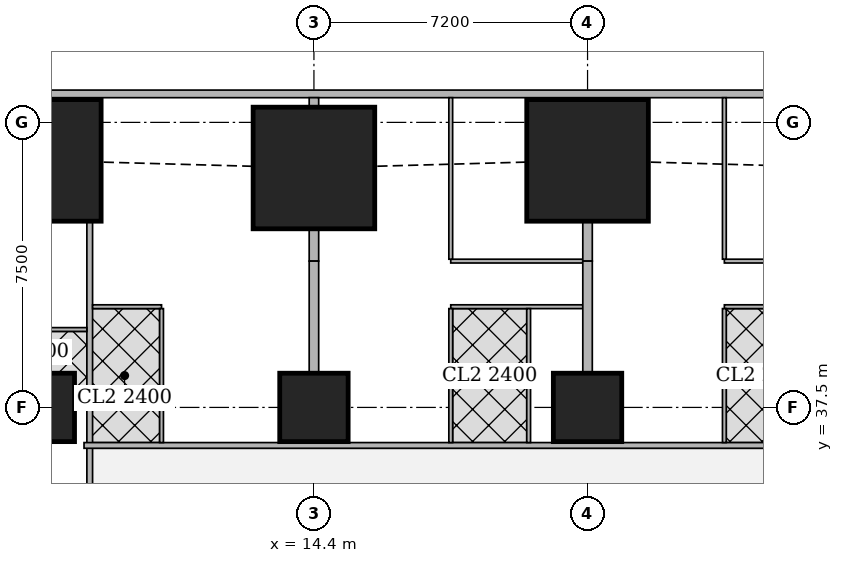
"""IFC4 building model, lengths in metres.
Left out: names, types, materials, properties, quantities, classifications, styles, units other than length and angle.
Written with IfcOpenShell. Run it as: python <this file> out.ifc"""

import sys

from ifc_helpers import new_model, si_unit, direction, frame, frame_2d, origin, origin_2d, place, context, subcontext, project, spatial, rectangle, extrude, element, fill, save


model = new_model("IFC4")
c1 = context("Model", 3, precision=1e-05, world=origin(), true_north=direction((0.0, 1.0)))
c2 = subcontext(c1, "Body", "Model", "MODEL_VIEW")
j1 = project(units=[si_unit("LENGTHUNIT", "METRE"), si_unit("PLANEANGLEUNIT", "RADIAN")], contexts=[c1])
p1 = place(None, origin())
s1 = spatial("IfcSite", under=j1, at=p1, CompositionType="ELEMENT")
p2 = place(p1, origin())
s2 = spatial("IfcBuilding", under=s1, at=p2, CompositionType="ELEMENT")
p3 = place(p2, frame((0.0, 0.0, 20.0)))
s3 = spatial("IfcBuildingStorey", under=s2, at=p3, CompositionType="ELEMENT", Elevation=20.0)
for number, where, z_axis, x_axis in (
    (1, (7.2, 37.5, 0.0), (0.0, 0.0, 1.0), (1.0, 0.0, 0.0)),
    (2, (14.4, 37.5, 0.0), (0.0, 0.0, 1.0), (1.0, 0.0, 0.0)),
    (3, (21.6, 37.5, 0.0), (0.0, 0.0, 1.0), (1.0, 0.0, 0.0)),
):
    element("IfcColumn", number, at=place(p3, frame(where, z_axis=z_axis, x_axis=x_axis)), inside=s3, PredefinedType="COLUMN", context=c2, shape_type="SweptSolid", body=[
        extrude(rectangle(XDim=1.8, YDim=1.8, at=origin_2d()), origin(), (0.0, 0.0, 1.0), 3.75),
    ])
p4 = place(p3, frame((7.2, 44.0, -0.3), z_axis=(0.0, 0.0, 1.0), x_axis=(1.0, 0.0, 0.0)))
e4 = element("IfcColumn", 4, at=p4, inside=s3, PredefinedType="COLUMN", context=c2, shape_type="SweptSolid", body=[
    extrude(rectangle(XDim=3.2, YDim=3.2, at=origin_2d()), origin(), (0.0, 0.0, 1.0), 4.05),
])
p5 = place(p3, frame((14.4, 43.8, 0.0), z_axis=(0.0, 0.0, 1.0), x_axis=(1.0, 0.0, 0.0)))
e5 = element("IfcColumn", 5, at=p5, inside=s3, PredefinedType="COLUMN", context=c2, shape_type="SweptSolid", body=[
    extrude(rectangle(XDim=3.2, YDim=3.2, at=origin_2d()), origin(), (0.0, 0.0, 1.0), 3.75),
])
p6 = place(p3, frame((21.6, 44.0, -0.3), z_axis=(0.0, 0.0, 1.0), x_axis=(1.0, 0.0, 0.0)))
e6 = element("IfcColumn", 6, at=p6, inside=s3, PredefinedType="COLUMN", context=c2, shape_type="SweptSolid", body=[
    extrude(rectangle(XDim=3.2, YDim=3.2, at=origin_2d()), origin(), (0.0, 0.0, 1.0), 4.05),
])
p7 = place(p3, frame((40.106, 45.75, 0.0), z_axis=(0.0, 0.0, 1.0), x_axis=(-1.0, 0.0, 0.0)))
e7 = element("IfcWall", 7, at=p7, inside=s3, PredefinedType="SOLIDWALL", context=c2, shape_type="SweptSolid", body=[
    extrude(rectangle(XDim=37.943, YDim=0.2, at=frame_2d((18.971, 0.0))), origin(), (0.0, 0.0, 1.0), 3.5),
])
p8 = place(p7, frame((8.606, 0.0, 0.9)))
e8 = element("IfcOpeningElement", 8, at=p8, cuts=e7, PredefinedType="OPENING", context=c2, shape_type="SweptSolid", body=[
    extrude(rectangle(XDim=1.8, YDim=1.5, at=frame_2d((0.9, 0.75))), frame((0.0, 0.11, 0.0), z_axis=(0.0, -1.0, 0.0), x_axis=(1.0, 0.0, 0.0)), (0.0, 0.0, 1.0), 0.22),
])
p9 = place(p7, frame((12.206, 0.0, 0.9)))
e9 = element("IfcOpeningElement", 9, at=p9, cuts=e7, PredefinedType="OPENING", context=c2, shape_type="SweptSolid", body=[
    extrude(rectangle(XDim=1.8, YDim=1.5, at=frame_2d((0.9, 0.75))), frame((0.0, 0.11, 0.0), z_axis=(0.0, -1.0, 0.0), x_axis=(1.0, 0.0, 0.0)), (0.0, 0.0, 1.0), 0.22),
])
p10 = place(p7, frame((15.806, 0.0, 0.9)))
e10 = element("IfcOpeningElement", 10, at=p10, cuts=e7, PredefinedType="OPENING", context=c2, shape_type="SweptSolid", body=[
    extrude(rectangle(XDim=1.8, YDim=1.5, at=frame_2d((0.9, 0.75))), frame((0.0, 0.11, 0.0), z_axis=(0.0, -1.0, 0.0), x_axis=(1.0, 0.0, 0.0)), (0.0, 0.0, 1.0), 0.22),
])
p11 = place(p7, frame((19.406, 0.0, 0.9)))
e11 = element("IfcOpeningElement", 11, at=p11, cuts=e7, PredefinedType="OPENING", context=c2, shape_type="SweptSolid", body=[
    extrude(rectangle(XDim=1.8, YDim=1.5, at=frame_2d((0.9, 0.75))), frame((0.0, 0.11, 0.0), z_axis=(0.0, -1.0, 0.0), x_axis=(1.0, 0.0, 0.0)), (0.0, 0.0, 1.0), 0.22),
])
p12 = place(p7, frame((23.006, 0.0, 0.9)))
e12 = element("IfcOpeningElement", 12, at=p12, cuts=e7, PredefinedType="OPENING", context=c2, shape_type="SweptSolid", body=[
    extrude(rectangle(XDim=1.8, YDim=1.5, at=frame_2d((0.9, 0.75))), frame((0.0, 0.11, 0.0), z_axis=(0.0, -1.0, 0.0), x_axis=(1.0, 0.0, 0.0)), (0.0, 0.0, 1.0), 0.22),
])
p13 = place(p7, frame((26.606, 0.0, 0.9)))
e13 = element("IfcOpeningElement", 13, at=p13, cuts=e7, PredefinedType="OPENING", context=c2, shape_type="SweptSolid", body=[
    extrude(rectangle(XDim=1.8, YDim=1.5, at=frame_2d((0.9, 0.75))), frame((0.0, 0.11, 0.0), z_axis=(0.0, -1.0, 0.0), x_axis=(1.0, 0.0, 0.0)), (0.0, 0.0, 1.0), 0.22),
])
p14 = place(p3, frame((8.5, 2.626, 0.0), z_axis=(0.0, 0.0, 1.0), x_axis=(0.0, 1.0, 0.0)))
e14 = element("IfcWall", 14, at=p14, inside=s3, PredefinedType="SOLIDWALL", context=c2, shape_type="SweptSolid", body=[
    extrude(rectangle(XDim=39.773, YDim=0.15, at=frame_2d((19.886, 0.0))), origin(), (0.0, 0.0, 1.0), 2.05),
])
p15 = place(p14, frame((9.786, 0.0, 0.0)))
e15 = element("IfcOpeningElement", 15, at=p15, cuts=e14, PredefinedType="OPENING", context=c2, shape_type="SweptSolid", body=[
    extrude(rectangle(XDim=1.0, YDim=2.0, at=frame_2d((0.5, 1.0))), frame((0.0, 0.085, 0.0), z_axis=(0.0, -1.0, 0.0), x_axis=(1.0, 0.0, 0.0)), (0.0, 0.0, 1.0), 0.17),
])
p16 = place(p14, frame((13.961, 0.0, 0.0)))
e16 = element("IfcOpeningElement", 16, at=p16, cuts=e14, PredefinedType="OPENING", context=c2, shape_type="SweptSolid", body=[
    extrude(rectangle(XDim=1.0, YDim=2.0, at=frame_2d((0.5, 1.0))), frame((0.0, 0.085, 0.0), z_axis=(0.0, -1.0, 0.0), x_axis=(1.0, 0.0, 0.0)), (0.0, 0.0, 1.0), 0.17),
])
p17 = place(p14, frame((24.787, 0.0, 0.0)))
e17 = element("IfcOpeningElement", 17, at=p17, cuts=e14, PredefinedType="OPENING", context=c2, shape_type="SweptSolid", body=[
    extrude(rectangle(XDim=1.0, YDim=2.0, at=frame_2d((0.5, 1.0))), frame((0.0, 0.085, 0.0), z_axis=(0.0, -1.0, 0.0), x_axis=(1.0, 0.0, 0.0)), (0.0, 0.0, 1.0), 0.17),
])
p18 = place(p14, frame((32.287, 0.0, 0.0)))
e18 = element("IfcOpeningElement", 18, at=p18, cuts=e14, PredefinedType="OPENING", context=c2, shape_type="SweptSolid", body=[
    extrude(rectangle(XDim=1.0, YDim=2.0, at=frame_2d((0.5, 1.0))), frame((0.0, 0.085, 0.0), z_axis=(0.0, -1.0, 0.0), x_axis=(1.0, 0.0, 0.0)), (0.0, 0.0, 1.0), 0.17),
])
p19 = place(p3, frame((8.35, 36.5, 0.0), z_axis=(0.0, 0.0, 1.0), x_axis=(1.0, 0.0, 0.0)))
e19 = element("IfcWall", 19, at=p19, inside=s3, PredefinedType="SOLIDWALL", context=c2, shape_type="SweptSolid", body=[
    extrude(rectangle(XDim=26.415, YDim=0.15, at=frame_2d((13.208, 0.0))), origin(), (0.0, 0.0, 1.0), 3.5),
])
p20 = place(p19, frame((3.383, 0.0, 0.0)))
e20 = element("IfcOpeningElement", 20, at=p20, cuts=e19, PredefinedType="OPENING", context=c2, shape_type="SweptSolid", body=[
    extrude(rectangle(XDim=1.0, YDim=2.1, at=frame_2d((0.5, 1.05))), frame((0.0, 0.085, 0.0), z_axis=(0.0, -1.0, 0.0), x_axis=(1.0, 0.0, 0.0)), (0.0, 0.0, 1.0), 0.17),
])
p21 = place(p19, frame((7.65, 0.0, 0.0)))
e21 = element("IfcOpeningElement", 21, at=p21, cuts=e19, PredefinedType="OPENING", context=c2, shape_type="SweptSolid", body=[
    extrude(rectangle(XDim=1.0, YDim=2.1, at=frame_2d((0.5, 1.05))), frame((0.0, 0.085, 0.0), z_axis=(0.0, -1.0, 0.0), x_axis=(1.0, 0.0, 0.0)), (0.0, 0.0, 1.0), 0.17),
])
p22 = place(p19, frame((14.857, 0.0, 0.0)))
e22 = element("IfcOpeningElement", 22, at=p22, cuts=e19, PredefinedType="OPENING", context=c2, shape_type="SweptSolid", body=[
    extrude(rectangle(XDim=1.0, YDim=2.1, at=frame_2d((0.5, 1.05))), frame((0.0, 0.085, 0.0), z_axis=(0.0, -1.0, 0.0), x_axis=(1.0, 0.0, 0.0)), (0.0, 0.0, 1.0), 0.17),
])
p23 = place(p3, frame((8.101, 37.5, 0.0), z_axis=(0.0, 0.0, 1.0), x_axis=(1.0, 0.0, 0.0)))
e23 = element("IfcWall", 23, at=p23, inside=s3, PredefinedType="PARTITIONING", context=c2, shape_type="SweptSolid", body=[
    extrude(rectangle(XDim=0.324, YDim=0.1, at=frame_2d((0.162, 0.0))), origin(), (0.0, 0.0, 1.0), 3.5),
])
p24 = place(p3, frame((4.9, 39.55, 0.0), z_axis=(0.0, 0.0, 1.0), x_axis=(1.0, 0.0, 0.0)))
e24 = element("IfcWall", 24, at=p24, inside=s3, PredefinedType="PARTITIONING", context=c2, shape_type="SweptSolid", body=[
    extrude(rectangle(XDim=3.525, YDim=0.1, at=frame_2d((1.763, 0.0))), origin(), (0.0, 0.0, 1.0), 3.5),
])
p25 = place(p3, frame((8.575, 40.15, 0.0), z_axis=(0.0, 0.0, 1.0), x_axis=(1.0, 0.0, 0.0)))
e25 = element("IfcWall", 25, at=p25, inside=s3, PredefinedType="PARTITIONING", context=c2, shape_type="SweptSolid", body=[
    extrude(rectangle(XDim=1.815, YDim=0.1, at=frame_2d((0.907, 0.0))), origin(), (0.0, 0.0, 1.0), 3.5),
])
p26 = place(p25, frame((0.425, 0.0, 0.0)))
e26 = element("IfcOpeningElement", 26, at=p26, cuts=e25, PredefinedType="OPENING", context=c2, shape_type="SweptSolid", body=[
    extrude(rectangle(XDim=0.9, YDim=2.1, at=frame_2d((0.45, 1.05))), frame((0.0, 0.06, 0.0), z_axis=(0.0, -1.0, 0.0), x_axis=(1.0, 0.0, 0.0)), (0.0, 0.0, 1.0), 0.12),
])
p27 = place(p3, frame((10.39, 36.575, 0.0), z_axis=(0.0, 0.0, 1.0), x_axis=(0.0, 1.0, 0.0)))
e27 = element("IfcWall", 27, at=p27, inside=s3, PredefinedType="PARTITIONING", context=c2, shape_type="SweptSolid", body=[
    extrude(rectangle(XDim=3.525, YDim=0.1, at=frame_2d((1.763, 0.0))), origin(), (0.0, 0.0, 1.0), 3.5),
])
p28 = place(p3, frame((18.0, 41.35, 0.0), z_axis=(0.0, 0.0, 1.0), x_axis=(1.0, 0.0, 0.0)))
e28 = element("IfcWall", 28, at=p28, inside=s3, PredefinedType="PARTITIONING", context=c2, shape_type="SweptSolid", body=[
    extrude(rectangle(XDim=3.475, YDim=0.1, at=frame_2d((1.738, 0.0))), origin(), (0.0, 0.0, 1.0), 3.5),
])
p29 = place(p28, frame((0.2, 0.0, 0.0)))
e29 = element("IfcOpeningElement", 29, at=p29, cuts=e28, PredefinedType="OPENING", context=c2, shape_type="SweptSolid", body=[
    extrude(rectangle(XDim=0.9, YDim=2.1, at=frame_2d((0.45, 1.05))), frame((0.0, 0.06, 0.0), z_axis=(0.0, -1.0, 0.0), x_axis=(1.0, 0.0, 0.0)), (0.0, 0.0, 1.0), 0.12),
])
p30 = place(p3, frame((18.0, 40.15, 0.0), z_axis=(0.0, 0.0, 1.0), x_axis=(1.0, 0.0, 0.0)))
e30 = element("IfcWall", 30, at=p30, inside=s3, PredefinedType="PARTITIONING", context=c2, shape_type="SweptSolid", body=[
    extrude(rectangle(XDim=3.475, YDim=0.1, at=frame_2d((1.738, 0.0))), origin(), (0.0, 0.0, 1.0), 3.5),
])
p31 = place(p30, frame((0.575, 0.0, 0.0)))
e31 = element("IfcOpeningElement", 31, at=p31, cuts=e30, PredefinedType="OPENING", context=c2, shape_type="SweptSolid", body=[
    extrude(rectangle(XDim=0.9, YDim=2.1, at=frame_2d((0.45, 1.05))), frame((0.0, 0.06, 0.0), z_axis=(0.0, -1.0, 0.0), x_axis=(1.0, 0.0, 0.0)), (0.0, 0.0, 1.0), 0.12),
])
p32 = place(p30, frame((2.375, 0.0, 0.0)))
e32 = element("IfcOpeningElement", 32, at=p32, cuts=e30, PredefinedType="OPENING", context=c2, shape_type="SweptSolid", body=[
    extrude(rectangle(XDim=0.9, YDim=2.1, at=frame_2d((0.45, 1.05))), frame((0.0, 0.06, 0.0), z_axis=(0.0, -1.0, 0.0), x_axis=(1.0, 0.0, 0.0)), (0.0, 0.0, 1.0), 0.12),
])
p33 = place(p3, frame((18.0, 41.4, 0.0), z_axis=(0.0, 0.0, 1.0), x_axis=(0.0, 1.0, 0.0)))
e33 = element("IfcWall", 33, at=p33, inside=s3, PredefinedType="PARTITIONING", context=c2, shape_type="SweptSolid", body=[
    extrude(rectangle(XDim=4.25, YDim=0.1, at=frame_2d((2.125, 0.0))), origin(), (0.0, 0.0, 1.0), 2.05),
])
for number, where, z_axis, x_axis in (
    (34, (18.0, 36.575, 0.0), (0.0, 0.0, 1.0), (0.0, 1.0, 0.0)),
    (35, (20.05, 36.575, 0.0), (0.0, 0.0, 1.0), (0.0, 1.0, 0.0)),
):
    element("IfcWall", number, at=place(p3, frame(where, z_axis=z_axis, x_axis=x_axis)), inside=s3, PredefinedType="PARTITIONING", context=c2, shape_type="SweptSolid", body=[
        extrude(rectangle(XDim=3.525, YDim=0.1, at=frame_2d((1.763, 0.0))), origin(), (0.0, 0.0, 1.0), 3.5),
    ])
p34 = place(p3, frame((14.4, 41.35, 0.0), z_axis=(0.0, 0.0, 1.0), x_axis=(0.0, 1.0, 0.0)))
e36 = element("IfcWall", 36, at=p34, inside=s3, PredefinedType="SOLIDWALL", context=c2, shape_type="SweptSolid", body=[
    extrude(rectangle(XDim=0.849, YDim=0.25, at=frame_2d((0.424, 0.0))), origin(), (0.0, 0.0, 1.0), 2.05),
])
p35 = place(p3, frame((14.4, 45.401, 0.0), z_axis=(0.0, 0.0, 1.0), x_axis=(0.0, 1.0, 0.0)))
e37 = element("IfcWall", 37, at=p35, inside=s3, PredefinedType="SOLIDWALL", context=c2, shape_type="SweptSolid", body=[
    extrude(rectangle(XDim=0.249, YDim=0.25, at=frame_2d((0.125, 0.0))), origin(), (0.0, 0.0, 1.0), 2.05),
])
p36 = place(p3, frame((14.4, 38.401, 0.0), z_axis=(0.0, 0.0, 1.0), x_axis=(0.0, 1.0, 0.0)))
e38 = element("IfcWall", 38, at=p36, inside=s3, PredefinedType="SOLIDWALL", context=c2, shape_type="SweptSolid", body=[
    extrude(rectangle(XDim=2.949, YDim=0.25, at=frame_2d((1.475, 0.0))), origin(), (0.0, 0.0, 1.0), 3.5),
])
p37 = place(p3, frame((25.2, 41.35, 0.0), z_axis=(0.0, 0.0, 1.0), x_axis=(1.0, 0.0, 0.0)))
e39 = element("IfcWall", 39, at=p37, inside=s3, PredefinedType="PARTITIONING", context=c2, shape_type="SweptSolid", body=[
    extrude(rectangle(XDim=8.653, YDim=0.1, at=frame_2d((4.327, 0.0))), origin(), (0.0, 0.0, 1.0), 3.5),
])
p38 = place(p37, frame((0.2, 0.0, 0.0)))
e40 = element("IfcOpeningElement", 40, at=p38, cuts=e39, PredefinedType="OPENING", context=c2, shape_type="SweptSolid", body=[
    extrude(rectangle(XDim=0.9, YDim=2.1, at=frame_2d((0.45, 1.05))), frame((0.0, 0.06, 0.0), z_axis=(0.0, -1.0, 0.0), x_axis=(1.0, 0.0, 0.0)), (0.0, 0.0, 1.0), 0.12),
])
p39 = place(p37, frame((5.25, 0.0, 0.0)))
e41 = element("IfcOpeningElement", 41, at=p39, cuts=e39, PredefinedType="OPENING", context=c2, shape_type="SweptSolid", body=[
    extrude(rectangle(XDim=0.9, YDim=2.1, at=frame_2d((0.45, 1.05))), frame((0.0, 0.06, 0.0), z_axis=(0.0, -1.0, 0.0), x_axis=(1.0, 0.0, 0.0)), (0.0, 0.0, 1.0), 0.12),
])
p40 = place(p3, frame((25.2, 40.15, 0.0), z_axis=(0.0, 0.0, 1.0), x_axis=(1.0, 0.0, 0.0)))
e42 = element("IfcWall", 42, at=p40, inside=s3, PredefinedType="PARTITIONING", context=c2, shape_type="SweptSolid", body=[
    extrude(rectangle(XDim=8.88, YDim=0.1, at=frame_2d((4.44, 0.0))), origin(), (0.0, 0.0, 1.0), 3.5),
])
p41 = place(p40, frame((0.575, 0.0, 0.0)))
e43 = element("IfcOpeningElement", 43, at=p41, cuts=e42, PredefinedType="OPENING", context=c2, shape_type="SweptSolid", body=[
    extrude(rectangle(XDim=0.9, YDim=2.1, at=frame_2d((0.45, 1.05))), frame((0.0, 0.06, 0.0), z_axis=(0.0, -1.0, 0.0), x_axis=(1.0, 0.0, 0.0)), (0.0, 0.0, 1.0), 0.12),
])
p42 = place(p40, frame((3.95, 0.0, 0.0)))
e44 = element("IfcOpeningElement", 44, at=p42, cuts=e42, PredefinedType="OPENING", context=c2, shape_type="SweptSolid", body=[
    extrude(rectangle(XDim=0.9, YDim=2.1, at=frame_2d((0.45, 1.05))), frame((0.0, 0.06, 0.0), z_axis=(0.0, -1.0, 0.0), x_axis=(1.0, 0.0, 0.0)), (0.0, 0.0, 1.0), 0.12),
])
p43 = place(p40, frame((7.83, 0.0, 0.0)))
e45 = element("IfcOpeningElement", 45, at=p43, cuts=e42, PredefinedType="OPENING", context=c2, shape_type="SweptSolid", body=[
    extrude(rectangle(XDim=0.9, YDim=2.1, at=frame_2d((0.45, 1.05))), frame((0.0, 0.06, 0.0), z_axis=(0.0, -1.0, 0.0), x_axis=(1.0, 0.0, 0.0)), (0.0, 0.0, 1.0), 0.12),
])
p44 = place(p40, frame((2.375, 0.0, 0.0)))
e46 = element("IfcOpeningElement", 46, at=p44, cuts=e42, PredefinedType="OPENING", context=c2, shape_type="SweptSolid", body=[
    extrude(rectangle(XDim=0.9, YDim=2.1, at=frame_2d((0.45, 1.05))), frame((0.0, 0.06, 0.0), z_axis=(0.0, -1.0, 0.0), x_axis=(1.0, 0.0, 0.0)), (0.0, 0.0, 1.0), 0.12),
])
p45 = place(p40, frame((5.75, 0.0, 0.0)))
e47 = element("IfcOpeningElement", 47, at=p45, cuts=e42, PredefinedType="OPENING", context=c2, shape_type="SweptSolid", body=[
    extrude(rectangle(XDim=0.9, YDim=2.1, at=frame_2d((0.45, 1.05))), frame((0.0, 0.06, 0.0), z_axis=(0.0, -1.0, 0.0), x_axis=(1.0, 0.0, 0.0)), (0.0, 0.0, 1.0), 0.12),
])
p46 = place(p3, frame((25.2, 41.4, 0.0), z_axis=(0.0, 0.0, 1.0), x_axis=(0.0, 1.0, 0.0)))
e48 = element("IfcWall", 48, at=p46, inside=s3, PredefinedType="PARTITIONING", context=c2, shape_type="SweptSolid", body=[
    extrude(rectangle(XDim=4.25, YDim=0.1, at=frame_2d((2.125, 0.0))), origin(), (0.0, 0.0, 1.0), 2.05),
])
p47 = place(p3, frame((25.2, 36.575, 0.0), z_axis=(0.0, 0.0, 1.0), x_axis=(0.0, 1.0, 0.0)))
e49 = element("IfcWall", 49, at=p47, inside=s3, PredefinedType="PARTITIONING", context=c2, shape_type="SweptSolid", body=[
    extrude(rectangle(XDim=3.525, YDim=0.1, at=frame_2d((1.763, 0.0))), origin(), (0.0, 0.0, 1.0), 3.5),
])
p48 = place(p3, frame((21.6, 41.35, 0.0), z_axis=(0.0, 0.0, 1.0), x_axis=(0.0, 1.0, 0.0)))
e50 = element("IfcWall", 50, at=p48, inside=s3, PredefinedType="SOLIDWALL", context=c2, shape_type="SweptSolid", body=[
    extrude(rectangle(XDim=1.049, YDim=0.25, at=frame_2d((0.524, 0.0))), origin(), (0.0, 0.0, 1.0), 2.05),
])
p49 = place(p3, frame((21.6, 38.401, 0.0), z_axis=(0.0, 0.0, 1.0), x_axis=(0.0, 1.0, 0.0)))
e51 = element("IfcWall", 51, at=p49, inside=s3, PredefinedType="SOLIDWALL", context=c2, shape_type="SweptSolid", body=[
    extrude(rectangle(XDim=2.949, YDim=0.25, at=frame_2d((1.475, 0.0))), origin(), (0.0, 0.0, 1.0), 3.5),
])
p50 = place(p9, origin())
e52 = element("IfcWindow", 52, at=p50, inside=s3, PartitioningType="SINGLE_PANEL", PredefinedType="WINDOW", context=c2, shape_type="SweptSolid", body=[
    extrude(rectangle(XDim=1.8, YDim=1.5, at=frame_2d((0.9, 0.75))), frame((0.0, 0.03, 0.0), z_axis=(0.0, -1.0, 0.0), x_axis=(1.0, 0.0, 0.0)), (0.0, 0.0, 1.0), 0.06),
])
fill(e9, e52)
p51 = place(p10, origin())
e53 = element("IfcWindow", 53, at=p51, inside=s3, PartitioningType="SINGLE_PANEL", PredefinedType="WINDOW", context=c2, shape_type="SweptSolid", body=[
    extrude(rectangle(XDim=1.8, YDim=1.5, at=frame_2d((0.9, 0.75))), frame((0.0, 0.03, 0.0), z_axis=(0.0, -1.0, 0.0), x_axis=(1.0, 0.0, 0.0)), (0.0, 0.0, 1.0), 0.06),
])
fill(e10, e53)
p52 = place(p11, origin())
e54 = element("IfcWindow", 54, at=p52, inside=s3, PartitioningType="SINGLE_PANEL", PredefinedType="WINDOW", context=c2, shape_type="SweptSolid", body=[
    extrude(rectangle(XDim=1.8, YDim=1.5, at=frame_2d((0.9, 0.75))), frame((0.0, 0.03, 0.0), z_axis=(0.0, -1.0, 0.0), x_axis=(1.0, 0.0, 0.0)), (0.0, 0.0, 1.0), 0.06),
])
fill(e11, e54)
p53 = place(p12, origin())
e55 = element("IfcWindow", 55, at=p53, inside=s3, PartitioningType="SINGLE_PANEL", PredefinedType="WINDOW", context=c2, shape_type="SweptSolid", body=[
    extrude(rectangle(XDim=1.8, YDim=1.5, at=frame_2d((0.9, 0.75))), frame((0.0, 0.03, 0.0), z_axis=(0.0, -1.0, 0.0), x_axis=(1.0, 0.0, 0.0)), (0.0, 0.0, 1.0), 0.06),
])
fill(e12, e55)
p54 = place(p13, origin())
e56 = element("IfcWindow", 56, at=p54, inside=s3, PartitioningType="SINGLE_PANEL", PredefinedType="WINDOW", context=c2, shape_type="SweptSolid", body=[
    extrude(rectangle(XDim=1.8, YDim=1.5, at=frame_2d((0.9, 0.75))), frame((0.0, 0.03, 0.0), z_axis=(0.0, -1.0, 0.0), x_axis=(1.0, 0.0, 0.0)), (0.0, 0.0, 1.0), 0.06),
])
fill(e13, e56)
p55 = place(p18, origin())
e57 = element("IfcDoor", 57, at=p55, inside=s3, OperationType="SINGLE_SWING_LEFT", PredefinedType="DOOR", context=c2, shape_type="SweptSolid", body=[
    extrude(rectangle(XDim=1.0, YDim=2.0, at=frame_2d((0.5, 1.0))), frame((0.0, 0.025, 0.0), z_axis=(0.0, -1.0, 0.0), x_axis=(1.0, 0.0, 0.0)), (0.0, 0.0, 1.0), 0.05),
])
fill(e18, e57)
p56 = place(p26, origin())
e58 = element("IfcDoor", 58, at=p56, inside=s3, OperationType="SINGLE_SWING_RIGHT", PredefinedType="DOOR", context=c2, shape_type="SweptSolid", body=[
    extrude(rectangle(XDim=0.9, YDim=2.1, at=frame_2d((0.45, 1.05))), frame((0.0, 0.025, 0.0), z_axis=(0.0, -1.0, 0.0), x_axis=(1.0, 0.0, 0.0)), (0.0, 0.0, 1.0), 0.05),
])
fill(e26, e58)
p57 = place(p20, origin())
e59 = element("IfcDoor", 59, at=p57, inside=s3, OperationType="SINGLE_SWING_RIGHT", PredefinedType="DOOR", context=c2, shape_type="SweptSolid", body=[
    extrude(rectangle(XDim=1.0, YDim=2.1, at=frame_2d((0.5, 1.05))), frame((0.0, 0.025, 0.0), z_axis=(0.0, -1.0, 0.0), x_axis=(1.0, 0.0, 0.0)), (0.0, 0.0, 1.0), 0.05),
])
fill(e20, e59)
p58 = place(p29, origin())
e60 = element("IfcDoor", 60, at=p58, inside=s3, OperationType="SINGLE_SWING_LEFT", PredefinedType="DOOR", context=c2, shape_type="SweptSolid", body=[
    extrude(rectangle(XDim=0.9, YDim=2.1, at=frame_2d((0.45, 1.05))), frame((0.0, 0.025, 0.0), z_axis=(0.0, -1.0, 0.0), x_axis=(1.0, 0.0, 0.0)), (0.0, 0.0, 1.0), 0.05),
])
fill(e29, e60)
p59 = place(p31, origin())
e61 = element("IfcDoor", 61, at=p59, inside=s3, OperationType="SINGLE_SWING_RIGHT", PredefinedType="DOOR", context=c2, shape_type="SweptSolid", body=[
    extrude(rectangle(XDim=0.9, YDim=2.1, at=frame_2d((0.45, 1.05))), frame((0.0, 0.025, 0.0), z_axis=(0.0, -1.0, 0.0), x_axis=(1.0, 0.0, 0.0)), (0.0, 0.0, 1.0), 0.05),
])
fill(e31, e61)
p60 = place(p32, origin())
e62 = element("IfcDoor", 62, at=p60, inside=s3, OperationType="SINGLE_SWING_LEFT", PredefinedType="DOOR", context=c2, shape_type="SweptSolid", body=[
    extrude(rectangle(XDim=0.9, YDim=2.1, at=frame_2d((0.45, 1.05))), frame((0.0, 0.025, 0.0), z_axis=(0.0, -1.0, 0.0), x_axis=(1.0, 0.0, 0.0)), (0.0, 0.0, 1.0), 0.05),
])
fill(e32, e62)
p61 = place(p21, origin())
e63 = element("IfcDoor", 63, at=p61, inside=s3, OperationType="SINGLE_SWING_RIGHT", PredefinedType="DOOR", context=c2, shape_type="SweptSolid", body=[
    extrude(rectangle(XDim=1.0, YDim=2.1, at=frame_2d((0.5, 1.05))), frame((0.0, 0.025, 0.0), z_axis=(0.0, -1.0, 0.0), x_axis=(1.0, 0.0, 0.0)), (0.0, 0.0, 1.0), 0.05),
])
fill(e21, e63)
p62 = place(p38, origin())
e64 = element("IfcDoor", 64, at=p62, inside=s3, OperationType="SINGLE_SWING_LEFT", PredefinedType="DOOR", context=c2, shape_type="SweptSolid", body=[
    extrude(rectangle(XDim=0.9, YDim=2.1, at=frame_2d((0.45, 1.05))), frame((0.0, 0.025, 0.0), z_axis=(0.0, -1.0, 0.0), x_axis=(1.0, 0.0, 0.0)), (0.0, 0.0, 1.0), 0.05),
])
fill(e40, e64)
p63 = place(p41, origin())
e65 = element("IfcDoor", 65, at=p63, inside=s3, OperationType="SINGLE_SWING_RIGHT", PredefinedType="DOOR", context=c2, shape_type="SweptSolid", body=[
    extrude(rectangle(XDim=0.9, YDim=2.1, at=frame_2d((0.45, 1.05))), frame((0.0, 0.025, 0.0), z_axis=(0.0, -1.0, 0.0), x_axis=(1.0, 0.0, 0.0)), (0.0, 0.0, 1.0), 0.05),
])
fill(e43, e65)
p64 = place(p22, origin())
e66 = element("IfcDoor", 66, at=p64, inside=s3, OperationType="SINGLE_SWING_RIGHT", PredefinedType="DOOR", context=c2, shape_type="SweptSolid", body=[
    extrude(rectangle(XDim=1.0, YDim=2.1, at=frame_2d((0.5, 1.05))), frame((0.0, 0.025, 0.0), z_axis=(0.0, -1.0, 0.0), x_axis=(1.0, 0.0, 0.0)), (0.0, 0.0, 1.0), 0.05),
])
fill(e22, e66)
save(model, sys.argv[1])
